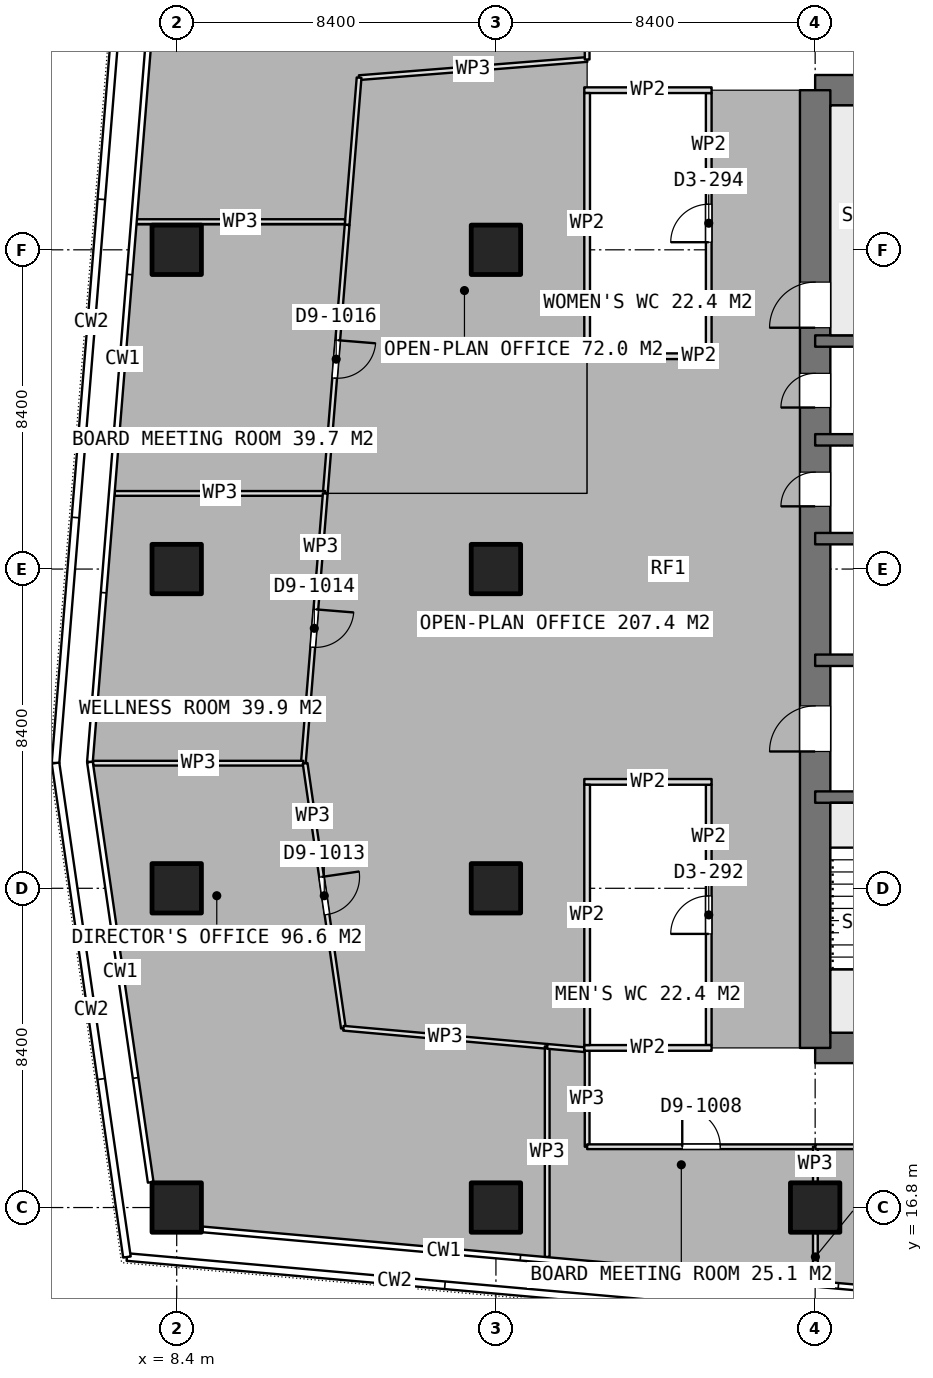
"""IFC4 building model, lengths in metres.
Left out: names, types, materials, properties, quantities, classifications, styles, units other than length and angle.
Written with IfcOpenShell. Run it as: python <this file> out.ifc"""

import sys

from ifc_helpers import new_model, si_unit, direction, frame, frame_2d, origin, origin_2d, place, context, subcontext, project, spatial, rectangle, extrude, element, fill, save


model = new_model("IFC4")
c1 = context("Model", 3, precision=1e-05, world=origin(), true_north=direction((0.0, 1.0)))
c2 = subcontext(c1, "Body", "Model", "MODEL_VIEW")
j1 = project(units=[si_unit("LENGTHUNIT", "METRE"), si_unit("PLANEANGLEUNIT", "RADIAN")], contexts=[c1])
p1 = place(None, origin())
s1 = spatial("IfcSite", under=j1, at=p1, CompositionType="ELEMENT")
p2 = place(p1, origin())
s2 = spatial("IfcBuilding", under=s1, at=p2, CompositionType="ELEMENT")
p3 = place(p2, frame((0.0, 0.0, 272.6)))
s3 = spatial("IfcBuildingStorey", under=s2, at=p3, CompositionType="ELEMENT", Elevation=272.6)
for number, where, z_axis, x_axis in (
    (1, (25.2, 21.0, 0.0), (0.0, 0.0, 1.0), (1.0, 0.0, 0.0)),
    (2, (25.2, 46.2, 0.0), (0.0, 0.0, 1.0), (1.0, 0.0, 0.0)),
):
    element("IfcWall", number, at=place(p3, frame(where, z_axis=z_axis, x_axis=x_axis)), inside=s3, PredefinedType="SHEAR", context=c2, shape_type="SweptSolid", body=[
        extrude(rectangle(XDim=10.4, YDim=0.8, at=frame_2d((5.2, 0.0))), origin(), (0.0, 0.0, 1.0), 3.75),
    ])
p4 = place(p3, frame((25.2, 21.0, 0.0), z_axis=(0.0, 0.0, 1.0), x_axis=(0.0, 1.0, 0.0)))
e3 = element("IfcWall", 3, at=p4, inside=s3, PredefinedType="SHEAR", context=c2, shape_type="SweptSolid", body=[
    extrude(rectangle(XDim=25.2, YDim=0.8, at=frame_2d((12.6, 0.0))), origin(), (0.0, 0.0, 1.0), 3.75),
])
p5 = place(p4, frame((7.8, 0.0, 0.0)))
e4 = element("IfcOpeningElement", 4, at=p5, cuts=e3, PredefinedType="OPENING", context=c2, shape_type="SweptSolid", body=[
    extrude(rectangle(XDim=1.2, YDim=2.1, at=frame_2d((0.6, 1.05))), frame((0.0, 0.41, 0.0), z_axis=(0.0, -1.0, 0.0), x_axis=(1.0, 0.0, 0.0)), (0.0, 0.0, 1.0), 0.82),
])
p6 = place(p4, frame((14.25, 0.0, 0.0)))
e5 = element("IfcOpeningElement", 5, at=p6, cuts=e3, PredefinedType="OPENING", context=c2, shape_type="SweptSolid", body=[
    extrude(rectangle(XDim=0.9, YDim=2.1, at=frame_2d((0.45, 1.05))), frame((0.0, 0.41, 0.0), z_axis=(0.0, -1.0, 0.0), x_axis=(1.0, 0.0, 0.0)), (0.0, 0.0, 1.0), 0.82),
])
p7 = place(p4, frame((16.85, 0.0, 0.0)))
e6 = element("IfcOpeningElement", 6, at=p7, cuts=e3, PredefinedType="OPENING", context=c2, shape_type="SweptSolid", body=[
    extrude(rectangle(XDim=0.9, YDim=2.1, at=frame_2d((0.45, 1.05))), frame((0.0, 0.41, 0.0), z_axis=(0.0, -1.0, 0.0), x_axis=(1.0, 0.0, 0.0)), (0.0, 0.0, 1.0), 0.82),
])
p8 = place(p4, frame((18.95, 0.0, 0.0)))
e7 = element("IfcOpeningElement", 7, at=p8, cuts=e3, PredefinedType="OPENING", context=c2, shape_type="SweptSolid", body=[
    extrude(rectangle(XDim=1.2, YDim=2.1, at=frame_2d((0.6, 1.05))), frame((0.0, 0.41, 0.0), z_axis=(0.0, -1.0, 0.0), x_axis=(1.0, 0.0, 0.0)), (0.0, 0.0, 1.0), 0.82),
])
p9 = place(p3, frame((25.2, 27.6, 0.0), z_axis=(0.0, 0.0, 1.0), x_axis=(1.0, 0.0, 0.0)))
e8 = element("IfcWall", 8, at=p9, inside=s3, PredefinedType="SHEAR", context=c2, shape_type="SweptSolid", body=[
    extrude(rectangle(XDim=6.6, YDim=0.3, at=frame_2d((3.3, 0.0))), origin(), (0.0, 0.0, 1.0), 3.75),
])
p10 = place(p9, frame((5.05, 0.0, 0.0)))
e9 = element("IfcOpeningElement", 9, at=p10, cuts=e8, PredefinedType="OPENING", context=c2, shape_type="SweptSolid", body=[
    extrude(rectangle(XDim=1.2, YDim=2.1, at=frame_2d((0.6, 1.05))), frame((0.0, 0.16, 0.0), z_axis=(0.0, -1.0, 0.0), x_axis=(1.0, 0.0, 0.0)), (0.0, 0.0, 1.0), 0.32),
])
p11 = place(p3, frame((25.2, 31.2, 0.0), z_axis=(0.0, 0.0, 1.0), x_axis=(1.0, 0.0, 0.0)))
e10 = element("IfcWall", 10, at=p11, inside=s3, PredefinedType="SHEAR", context=c2, shape_type="SweptSolid", body=[
    extrude(rectangle(XDim=6.6, YDim=0.3, at=frame_2d((3.3, 0.0))), origin(), (0.0, 0.0, 1.0), 3.75),
])
p12 = place(p11, frame((2.65, 0.0, 0.0)))
e11 = element("IfcOpeningElement", 11, at=p12, cuts=e10, PredefinedType="OPENING", context=c2, shape_type="SweptSolid", body=[
    extrude(rectangle(XDim=1.3, YDim=2.1, at=frame_2d((0.65, 1.05))), frame((0.0, 0.16, 0.0), z_axis=(0.0, -1.0, 0.0), x_axis=(1.0, 0.0, 0.0)), (0.0, 0.0, 1.0), 0.32),
])
for number, where, z_axis, x_axis in (
    (12, (25.2, 34.4, 0.0), (0.0, 0.0, 1.0), (1.0, 0.0, 0.0)),
    (13, (25.2, 37.0, 0.0), (0.0, 0.0, 1.0), (1.0, 0.0, 0.0)),
    (14, (25.2, 39.6, 0.0), (0.0, 0.0, 1.0), (1.0, 0.0, 0.0)),
):
    element("IfcWall", number, at=place(p3, frame(where, z_axis=z_axis, x_axis=x_axis)), inside=s3, PredefinedType="SHEAR", context=c2, shape_type="SweptSolid", body=[
        extrude(rectangle(XDim=6.6, YDim=0.3, at=frame_2d((3.3, 0.0))), origin(), (0.0, 0.0, 1.0), 3.75),
    ])
for number, where, z_axis, x_axis in (
    (15, (8.4, 16.8, 0.0), (0.0, 0.0, 1.0), (1.0, 0.0, 0.0)),
    (16, (8.4, 25.2, 0.0), (0.0, 0.0, 1.0), (1.0, 0.0, 0.0)),
    (17, (8.4, 33.6, 0.0), (0.0, 0.0, 1.0), (1.0, 0.0, 0.0)),
    (18, (8.4, 42.0, 0.0), (0.0, 0.0, 1.0), (1.0, 0.0, 0.0)),
    (19, (16.8, 16.8, 0.0), (0.0, 0.0, 1.0), (1.0, 0.0, 0.0)),
    (20, (16.8, 25.2, 0.0), (0.0, 0.0, 1.0), (1.0, 0.0, 0.0)),
    (21, (16.8, 33.6, 0.0), (0.0, 0.0, 1.0), (1.0, 0.0, 0.0)),
    (22, (16.8, 42.0, 0.0), (0.0, 0.0, 1.0), (1.0, 0.0, 0.0)),
    (23, (25.2, 16.8, 0.0), (0.0, 0.0, 1.0), (1.0, 0.0, 0.0)),
):
    element("IfcColumn", number, at=place(p3, frame(where, z_axis=z_axis, x_axis=x_axis)), inside=s3, PredefinedType="COLUMN", context=c2, shape_type="SweptSolid", body=[
        extrude(rectangle(XDim=1.3, YDim=1.3, at=origin_2d()), origin(), (0.0, 0.0, 1.0), 3.75),
    ])
for number, where, z_axis, x_axis in (
    (24, (19.125, 39.2, 0.0), (0.0, 0.0, 1.0), (1.0, 0.0, 0.0)),
    (25, (19.125, 46.2, 0.0), (0.0, 0.0, 1.0), (1.0, 0.0, 0.0)),
):
    element("IfcWall", number, at=place(p3, frame(where, z_axis=z_axis, x_axis=x_axis)), inside=s3, PredefinedType="PARTITIONING", context=c2, shape_type="SweptSolid", body=[
        extrude(rectangle(XDim=3.35, YDim=0.15, at=frame_2d((1.675, 0.0))), origin(), (0.0, 0.0, 1.0), 3.5),
    ])
p13 = place(p3, frame((19.2, 39.275, 0.0), z_axis=(0.0, 0.0, 1.0), x_axis=(0.0, 1.0, 0.0)))
e26 = element("IfcWall", 26, at=p13, inside=s3, PredefinedType="PARTITIONING", context=c2, shape_type="SweptSolid", body=[
    extrude(rectangle(XDim=6.85, YDim=0.15, at=frame_2d((3.425, 0.0))), origin(), (0.0, 0.0, 1.0), 3.5),
])
p14 = place(p3, frame((22.4, 39.275, 0.0), z_axis=(0.0, 0.0, 1.0), x_axis=(0.0, 1.0, 0.0)))
e27 = element("IfcWall", 27, at=p14, inside=s3, PredefinedType="PARTITIONING", context=c2, shape_type="SweptSolid", body=[
    extrude(rectangle(XDim=6.85, YDim=0.15, at=frame_2d((3.425, 0.0))), origin(), (0.0, 0.0, 1.0), 3.5),
])
p15 = place(p14, frame((2.925, 0.0, 0.0)))
e28 = element("IfcOpeningElement", 28, at=p15, cuts=e27, PredefinedType="OPENING", context=c2, shape_type="SweptSolid", body=[
    extrude(rectangle(XDim=1.0, YDim=2.1, at=frame_2d((0.5, 1.05))), frame((0.0, 0.085, 0.0), z_axis=(0.0, -1.0, 0.0), x_axis=(1.0, 0.0, 0.0)), (0.0, 0.0, 1.0), 0.17),
])
for number, where, z_axis, x_axis in (
    (29, (19.125, 21.0, 0.0), (0.0, 0.0, 1.0), (1.0, 0.0, 0.0)),
    (30, (19.125, 28.0, 0.0), (0.0, 0.0, 1.0), (1.0, 0.0, 0.0)),
):
    element("IfcWall", number, at=place(p3, frame(where, z_axis=z_axis, x_axis=x_axis)), inside=s3, PredefinedType="PARTITIONING", context=c2, shape_type="SweptSolid", body=[
        extrude(rectangle(XDim=3.35, YDim=0.15, at=frame_2d((1.675, 0.0))), origin(), (0.0, 0.0, 1.0), 3.5),
    ])
p16 = place(p3, frame((19.2, 21.075, 0.0), z_axis=(0.0, 0.0, 1.0), x_axis=(0.0, 1.0, 0.0)))
e31 = element("IfcWall", 31, at=p16, inside=s3, PredefinedType="PARTITIONING", context=c2, shape_type="SweptSolid", body=[
    extrude(rectangle(XDim=6.85, YDim=0.15, at=frame_2d((3.425, 0.0))), origin(), (0.0, 0.0, 1.0), 3.5),
])
p17 = place(p3, frame((22.4, 21.075, 0.0), z_axis=(0.0, 0.0, 1.0), x_axis=(0.0, 1.0, 0.0)))
e32 = element("IfcWall", 32, at=p17, inside=s3, PredefinedType="PARTITIONING", context=c2, shape_type="SweptSolid", body=[
    extrude(rectangle(XDim=6.85, YDim=0.15, at=frame_2d((3.425, 0.0))), origin(), (0.0, 0.0, 1.0), 3.5),
])
p18 = place(p17, frame((2.925, 0.0, 0.0)))
e33 = element("IfcOpeningElement", 33, at=p18, cuts=e32, PredefinedType="OPENING", context=c2, shape_type="SweptSolid", body=[
    extrude(rectangle(XDim=1.0, YDim=2.1, at=frame_2d((0.5, 1.05))), frame((0.0, 0.085, 0.0), z_axis=(0.0, -1.0, 0.0), x_axis=(1.0, 0.0, 0.0)), (0.0, 0.0, 1.0), 0.17),
])
p19 = place(p3, frame((19.2, 47.008, 0.0), z_axis=(0.0, 0.0, 1.0), x_axis=(-0.996842300725, -0.079406721921, 0.0)))
e34 = element("IfcWall", 34, at=p19, inside=s3, PredefinedType="PARTITIONING", context=c2, shape_type="SweptSolid", body=[
    extrude(rectangle(XDim=6.02, YDim=0.125, at=frame_2d((3.01, 0.0))), origin(), (0.0, 0.0, 1.0), 3.5),
])
p20 = place(p3, frame((13.199, 46.53, 0.0), z_axis=(0.0, 0.0, 1.0), x_axis=(-0.081048669132, -0.996710145043, 0.0)))
e35 = element("IfcWall", 35, at=p20, inside=s3, PredefinedType="PARTITIONING", context=c2, shape_type="SweptSolid", body=[
    extrude(rectangle(XDim=3.886, YDim=0.125, at=frame_2d((1.943, 0.0))), origin(), (0.0, 0.0, 1.0), 3.5),
])
p21 = place(p3, frame((12.828, 42.742, 0.0), z_axis=(0.0, 0.0, 1.0), x_axis=(-1.0, 0.0, 0.0)))
e36 = element("IfcWall", 36, at=p21, inside=s3, PredefinedType="PARTITIONING", context=c2, shape_type="SweptSolid", body=[
    extrude(rectangle(XDim=5.505, YDim=0.125, at=frame_2d((2.752, 0.0))), origin(), (0.0, 0.0, 1.0), 3.5),
])
p22 = place(p3, frame((19.2, 49.15, 0.0), z_axis=(0.0, 0.0, 1.0), x_axis=(0.0, -1.0, 0.0)))
e37 = element("IfcWall", 37, at=p22, inside=s3, PredefinedType="PARTITIONING", context=c2, shape_type="SweptSolid", body=[
    extrude(rectangle(XDim=2.142, YDim=0.125, at=frame_2d((1.071, 0.0))), origin(), (0.0, 0.0, 1.0), 3.5),
])
p23 = place(p22, frame((0.571, 0.0, 0.0)))
e38 = element("IfcOpeningElement", 38, at=p23, cuts=e37, PredefinedType="OPENING", context=c2, shape_type="SweptSolid", body=[
    extrude(rectangle(XDim=1.0, YDim=2.1, at=frame_2d((0.5, 1.05))), frame((0.0, 0.073, 0.0), z_axis=(0.0, -1.0, 0.0), x_axis=(1.0, 0.0, 0.0)), (0.0, 0.0, 1.0), 0.145),
])
p24 = place(p3, frame((12.884, 42.656, 0.0), z_axis=(0.0, 0.0, 1.0), x_axis=(-0.08110159124, -0.996705840205, 0.0)))
e39 = element("IfcWall", 39, at=p24, inside=s3, PredefinedType="PARTITIONING", context=c2, shape_type="SweptSolid", body=[
    extrude(rectangle(XDim=7.089, YDim=0.125, at=frame_2d((3.545, 0.0))), origin(), (0.0, 0.0, 1.0), 3.5),
])
p25 = place(p24, frame((3.045, 0.0, 0.0)))
e40 = element("IfcOpeningElement", 40, at=p25, cuts=e39, PredefinedType="OPENING", context=c2, shape_type="SweptSolid", body=[
    extrude(rectangle(XDim=1.0, YDim=2.1, at=frame_2d((0.5, 1.05))), frame((0.0, 0.073, 0.0), z_axis=(0.0, -1.0, 0.0), x_axis=(1.0, 0.0, 0.0)), (0.0, 0.0, 1.0), 0.145),
])
p26 = place(p3, frame((12.309, 35.59, 0.0), z_axis=(0.0, 0.0, 1.0), x_axis=(-1.0, 0.0, 0.0)))
e41 = element("IfcWall", 41, at=p26, inside=s3, PredefinedType="PARTITIONING", context=c2, shape_type="SweptSolid", body=[
    extrude(rectangle(XDim=5.538, YDim=0.125, at=frame_2d((2.769, 0.0))), origin(), (0.0, 0.0, 1.0), 3.5),
])
p27 = place(p3, frame((12.309, 35.589, 0.0), z_axis=(0.0, 0.0, 1.0), x_axis=(-0.081053384124, -0.996709761627, 0.0)))
e42 = element("IfcWall", 42, at=p27, inside=s3, PredefinedType="PARTITIONING", context=c2, shape_type="SweptSolid", body=[
    extrude(rectangle(XDim=7.121, YDim=0.125, at=frame_2d((3.56, 0.0))), origin(), (0.0, 0.0, 1.0), 3.5),
])
p28 = place(p27, frame((3.06, 0.0, 0.0)))
e43 = element("IfcOpeningElement", 43, at=p28, cuts=e42, PredefinedType="OPENING", context=c2, shape_type="SweptSolid", body=[
    extrude(rectangle(XDim=1.0, YDim=2.1, at=frame_2d((0.5, 1.05))), frame((0.0, 0.073, 0.0), z_axis=(0.0, -1.0, 0.0), x_axis=(1.0, 0.0, 0.0)), (0.0, 0.0, 1.0), 0.145),
])
p29 = place(p3, frame((11.732, 28.492, 0.0), z_axis=(0.0, 0.0, 1.0), x_axis=(-1.0, 0.0, 0.0)))
e44 = element("IfcWall", 44, at=p29, inside=s3, PredefinedType="PARTITIONING", context=c2, shape_type="SweptSolid", body=[
    extrude(rectangle(XDim=5.531, YDim=0.125, at=frame_2d((2.766, 0.0))), origin(), (0.0, 0.0, 1.0), 3.5),
])
p30 = place(p3, frame((11.779, 28.488, 0.0), z_axis=(0.0, 0.0, 1.0), x_axis=(0.143139230014, -0.989702561799, 0.0)))
e45 = element("IfcWall", 45, at=p30, inside=s3, PredefinedType="PARTITIONING", context=c2, shape_type="SweptSolid", body=[
    extrude(rectangle(XDim=7.042, YDim=0.125, at=frame_2d((3.521, 0.0))), origin(), (0.0, 0.0, 1.0), 3.5),
])
p31 = place(p30, frame((3.02, 0.0, 0.0)))
e46 = element("IfcOpeningElement", 46, at=p31, cuts=e45, PredefinedType="OPENING", context=c2, shape_type="SweptSolid", body=[
    extrude(rectangle(XDim=1.0, YDim=2.1, at=frame_2d((0.5, 1.05))), frame((0.0, 0.073, 0.0), z_axis=(0.0, -1.0, 0.0), x_axis=(1.0, 0.0, 0.0)), (0.0, 0.0, 1.0), 0.145),
])
p32 = place(p3, frame((12.787, 21.518, 0.0), z_axis=(0.0, 0.0, 1.0), x_axis=(0.996065348673, -0.088621787237, 0.0)))
e47 = element("IfcWall", 47, at=p32, inside=s3, PredefinedType="PARTITIONING", context=c2, shape_type="SweptSolid", body=[
    extrude(rectangle(XDim=5.383, YDim=0.125, at=frame_2d((2.691, 0.0))), origin(), (0.0, 0.0, 1.0), 3.5),
])
p33 = place(p3, frame((18.149, 21.041, 0.0), z_axis=(0.0, 0.0, 1.0), x_axis=(0.0, -1.0, 0.0)))
e48 = element("IfcWall", 48, at=p33, inside=s3, PredefinedType="PARTITIONING", context=c2, shape_type="SweptSolid", body=[
    extrude(rectangle(XDim=5.541, YDim=0.125, at=frame_2d((2.771, 0.0))), origin(), (0.0, 0.0, 1.0), 3.5),
])
p34 = place(p3, frame((18.15, 21.041, 0.0), z_axis=(0.0, 0.0, 1.0), x_axis=(0.996138836376, -0.087791905459, 0.0)))
e49 = element("IfcWall", 49, at=p34, inside=s3, PredefinedType="PARTITIONING", context=c2, shape_type="SweptSolid", body=[
    extrude(rectangle(XDim=0.979, YDim=0.125, at=frame_2d((0.489, 0.0))), origin(), (0.0, 0.0, 1.0), 3.5),
])
p35 = place(p3, frame((19.2, 20.925, 0.0), z_axis=(0.0, 0.0, 1.0), x_axis=(0.0, -1.0, 0.0)))
e50 = element("IfcWall", 50, at=p35, inside=s3, PredefinedType="PARTITIONING", context=c2, shape_type="SweptSolid", body=[
    extrude(rectangle(XDim=2.525, YDim=0.125, at=frame_2d((1.263, 0.0))), origin(), (0.0, 0.0, 1.0), 3.5),
])
p36 = place(p3, frame((19.2, 18.4, 0.0), z_axis=(0.0, 0.0, 1.0), x_axis=(1.0, 0.0, 0.0)))
e51 = element("IfcWall", 51, at=p36, inside=s3, PredefinedType="PARTITIONING", context=c2, shape_type="SweptSolid", body=[
    extrude(rectangle(XDim=6.006, YDim=0.125, at=frame_2d((3.003, 0.0))), origin(), (0.0, 0.0, 1.0), 3.5),
])
p37 = place(p36, frame((2.503, 0.0, 0.0)))
e52 = element("IfcOpeningElement", 52, at=p37, cuts=e51, PredefinedType="OPENING", context=c2, shape_type="SweptSolid", body=[
    extrude(rectangle(XDim=1.0, YDim=2.1, at=frame_2d((0.5, 1.05))), frame((0.0, 0.073, 0.0), z_axis=(0.0, -1.0, 0.0), x_axis=(1.0, 0.0, 0.0)), (0.0, 0.0, 1.0), 0.145),
])
p38 = place(p3, frame((25.206, 18.4, 0.0), z_axis=(0.0, 0.0, 1.0), x_axis=(0.0, -1.0, 0.0)))
e53 = element("IfcWall", 53, at=p38, inside=s3, PredefinedType="PARTITIONING", context=c2, shape_type="SweptSolid", body=[
    extrude(rectangle(XDim=0.93, YDim=0.125, at=frame_2d((0.465, 0.0))), origin(), (0.0, 0.0, 1.0), 3.5),
])
p39 = place(p3, frame((25.206, 16.13, 0.0), z_axis=(0.0, 0.0, 1.0), x_axis=(0.0, -1.0, 0.0)))
e54 = element("IfcWall", 54, at=p39, inside=s3, PredefinedType="PARTITIONING", context=c2, shape_type="SweptSolid", body=[
    extrude(rectangle(XDim=1.258, YDim=0.125, at=frame_2d((0.629, 0.0))), origin(), (0.0, 0.0, 1.0), 3.5),
])
p40 = place(p3, frame((25.207, 18.4, 0.0), z_axis=(0.0, 0.0, 1.0), x_axis=(1.0, 0.0, 0.0)))
e55 = element("IfcWall", 55, at=p40, inside=s3, PredefinedType="PARTITIONING", context=c2, shape_type="SweptSolid", body=[
    extrude(rectangle(XDim=9.74, YDim=0.125, at=frame_2d((4.87, 0.0))), origin(), (0.0, 0.0, 1.0), 3.5),
])
p41 = place(p40, frame((4.37, 0.0, 0.0)))
e56 = element("IfcOpeningElement", 56, at=p41, cuts=e55, PredefinedType="OPENING", context=c2, shape_type="SweptSolid", body=[
    extrude(rectangle(XDim=1.0, YDim=2.1, at=frame_2d((0.5, 1.05))), frame((0.0, 0.073, 0.0), z_axis=(0.0, -1.0, 0.0), x_axis=(1.0, 0.0, 0.0)), (0.0, 0.0, 1.0), 0.145),
])
p42 = place(p5, origin())
e57 = element("IfcDoor", 57, at=p42, inside=s3, OperationType="SINGLE_SWING_LEFT", PredefinedType="DOOR", context=c2, shape_type="SweptSolid", body=[
    extrude(rectangle(XDim=1.2, YDim=2.1, at=frame_2d((0.6, 1.05))), frame((0.0, 0.025, 0.0), z_axis=(0.0, -1.0, 0.0), x_axis=(1.0, 0.0, 0.0)), (0.0, 0.0, 1.0), 0.05),
])
fill(e4, e57)
p43 = place(p6, origin())
e58 = element("IfcDoor", 58, at=p43, inside=s3, OperationType="SINGLE_SWING_LEFT", PredefinedType="DOOR", context=c2, shape_type="SweptSolid", body=[
    extrude(rectangle(XDim=0.9, YDim=2.1, at=frame_2d((0.45, 1.05))), frame((0.0, 0.025, 0.0), z_axis=(0.0, -1.0, 0.0), x_axis=(1.0, 0.0, 0.0)), (0.0, 0.0, 1.0), 0.05),
])
fill(e5, e58)
p44 = place(p7, origin())
e59 = element("IfcDoor", 59, at=p44, inside=s3, OperationType="SINGLE_SWING_LEFT", PredefinedType="DOOR", context=c2, shape_type="SweptSolid", body=[
    extrude(rectangle(XDim=0.9, YDim=2.1, at=frame_2d((0.45, 1.05))), frame((0.0, 0.025, 0.0), z_axis=(0.0, -1.0, 0.0), x_axis=(1.0, 0.0, 0.0)), (0.0, 0.0, 1.0), 0.05),
])
fill(e6, e59)
p45 = place(p15, origin())
e60 = element("IfcDoor", 60, at=p45, inside=s3, OperationType="SINGLE_SWING_LEFT", PredefinedType="DOOR", context=c2, shape_type="SweptSolid", body=[
    extrude(rectangle(XDim=1.0, YDim=2.1, at=frame_2d((0.5, 1.05))), frame((0.0, 0.025, 0.0), z_axis=(0.0, -1.0, 0.0), x_axis=(1.0, 0.0, 0.0)), (0.0, 0.0, 1.0), 0.05),
])
fill(e28, e60)
p46 = place(p18, origin())
e61 = element("IfcDoor", 61, at=p46, inside=s3, OperationType="SINGLE_SWING_LEFT", PredefinedType="DOOR", context=c2, shape_type="SweptSolid", body=[
    extrude(rectangle(XDim=1.0, YDim=2.1, at=frame_2d((0.5, 1.05))), frame((0.0, 0.025, 0.0), z_axis=(0.0, -1.0, 0.0), x_axis=(1.0, 0.0, 0.0)), (0.0, 0.0, 1.0), 0.05),
])
fill(e33, e61)
p47 = place(p25, origin())
e62 = element("IfcDoor", 62, at=p47, inside=s3, OperationType="SINGLE_SWING_LEFT", PredefinedType="DOOR", context=c2, shape_type="SweptSolid", body=[
    extrude(rectangle(XDim=1.0, YDim=2.1, at=frame_2d((0.5, 1.05))), frame((0.0, 0.025, 0.0), z_axis=(0.0, -1.0, 0.0), x_axis=(1.0, 0.0, 0.0)), (0.0, 0.0, 1.0), 0.05),
])
fill(e40, e62)
p48 = place(p28, origin())
e63 = element("IfcDoor", 63, at=p48, inside=s3, OperationType="SINGLE_SWING_LEFT", PredefinedType="DOOR", context=c2, shape_type="SweptSolid", body=[
    extrude(rectangle(XDim=1.0, YDim=2.1, at=frame_2d((0.5, 1.05))), frame((0.0, 0.025, 0.0), z_axis=(0.0, -1.0, 0.0), x_axis=(1.0, 0.0, 0.0)), (0.0, 0.0, 1.0), 0.05),
])
fill(e43, e63)
p49 = place(p31, origin())
e64 = element("IfcDoor", 64, at=p49, inside=s3, OperationType="SINGLE_SWING_LEFT", PredefinedType="DOOR", context=c2, shape_type="SweptSolid", body=[
    extrude(rectangle(XDim=1.0, YDim=2.1, at=frame_2d((0.5, 1.05))), frame((0.0, 0.025, 0.0), z_axis=(0.0, -1.0, 0.0), x_axis=(1.0, 0.0, 0.0)), (0.0, 0.0, 1.0), 0.05),
])
fill(e46, e64)
p50 = place(p37, origin())
e65 = element("IfcDoor", 65, at=p50, inside=s3, OperationType="SINGLE_SWING_LEFT", PredefinedType="DOOR", context=c2, shape_type="SweptSolid", body=[
    extrude(rectangle(XDim=1.0, YDim=2.1, at=frame_2d((0.5, 1.05))), frame((0.0, 0.025, 0.0), z_axis=(0.0, -1.0, 0.0), x_axis=(1.0, 0.0, 0.0)), (0.0, 0.0, 1.0), 0.05),
])
fill(e52, e65)
p51 = place(p8, origin())
e66 = element("IfcDoor", 66, at=p51, inside=s3, OperationType="SINGLE_SWING_RIGHT", PredefinedType="DOOR", context=c2, shape_type="SweptSolid", body=[
    extrude(rectangle(XDim=1.2, YDim=2.1, at=frame_2d((0.6, 1.05))), frame((0.0, 0.025, 0.0), z_axis=(0.0, -1.0, 0.0), x_axis=(1.0, 0.0, 0.0)), (0.0, 0.0, 1.0), 0.05),
])
fill(e7, e66)
save(model, sys.argv[1])
